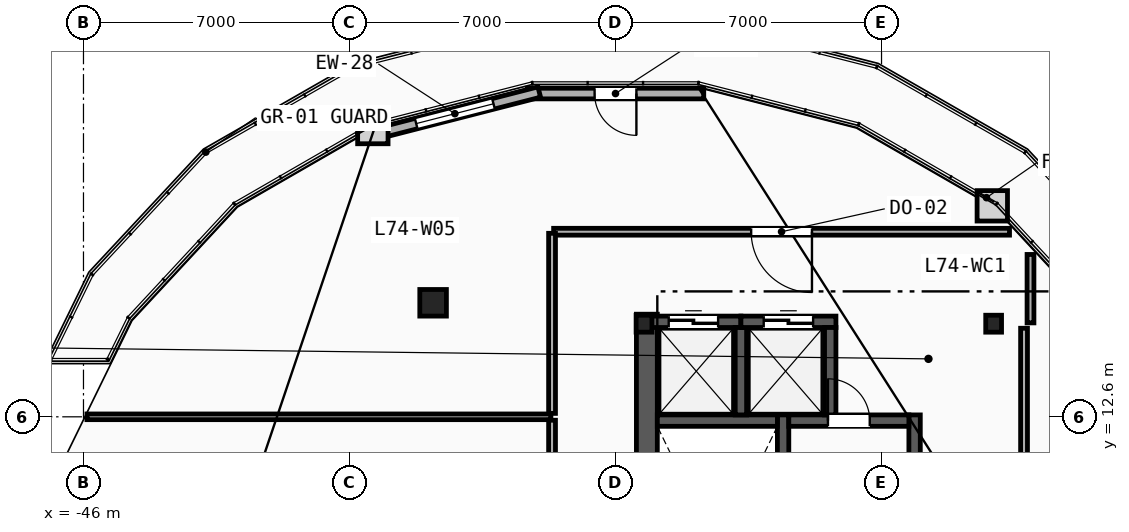
"""IFC4 building model, lengths in metres.
Left out: names, types, materials, properties, quantities, classifications, styles, units other than length and angle.
Written with IfcOpenShell. Run it as: python <this file> out.ifc"""

import sys

from ifc_helpers import new_model, si_unit, direction, frame, frame_2d, origin, origin_2d, place, context, subcontext, project, spatial, rectangle, i_section, extrude, element, fill, save


model = new_model("IFC4")
c1 = context("Model", 3, precision=1e-05, world=origin(), true_north=direction((0.0, 1.0)))
c2 = subcontext(c1, "Body", "Model", "MODEL_VIEW")
j1 = project(units=[si_unit("LENGTHUNIT", "METRE"), si_unit("PLANEANGLEUNIT", "RADIAN")], contexts=[c1])
p1 = place(None, origin())
s1 = spatial("IfcSite", under=j1, at=p1, CompositionType="ELEMENT")
p2 = place(p1, origin())
s2 = spatial("IfcBuilding", under=s1, at=p2, CompositionType="ELEMENT")
p3 = place(p2, frame((0.0, 0.0, 279.2)))
s3 = spatial("IfcBuildingStorey", under=s2, at=p3, CompositionType="ELEMENT", Elevation=279.2)
for number, where, z_axis, x_axis in (
    (1, (-22.05, 15.05, 0.0), (0.0, 0.0, 1.0), (1.0, 0.0, 0.0)),
    (2, (-31.25, 15.05, 0.0), (0.0, 0.0, 1.0), (1.0, 0.0, 0.0)),
):
    element("IfcColumn", number, at=place(p3, frame(where, z_axis=z_axis, x_axis=x_axis)), inside=s3, PredefinedType="COLUMN", context=c2, shape_type="SweptSolid", body=[
        extrude(i_section(OverallWidth=0.416, OverallDepth=0.446, WebThickness=0.039, FlangeThickness=0.063, FilletRadius=0.018, at=origin_2d()), origin(), (0.0, 0.0, 1.0), 3.6),
    ])
p4 = place(p3, frame((-36.8, 15.6, 0.0), z_axis=(0.0, 0.0, 1.0), x_axis=(1.0, 0.0, 0.0)))
e3 = element("IfcColumn", 3, at=p4, inside=s3, PredefinedType="COLUMN", context=c2, shape_type="SweptSolid", body=[
    extrude(rectangle(XDim=0.7, YDim=0.7, at=origin_2d()), origin(), (0.0, 0.0, 1.0), 3.6),
])
p5 = place(p3, frame((-29.678, 21.106, 0.0), z_axis=(0.0, 0.0, 1.0), x_axis=(-1.0, 0.0, 0.0)))
e4 = element("IfcWall", 4, at=p5, inside=s3, PredefinedType="SOLIDWALL", context=c2, shape_type="SweptSolid", body=[
    extrude(rectangle(XDim=4.644, YDim=0.28, at=frame_2d((2.322, 0.0))), origin(), (0.0, 0.0, 1.0), 3.34),
])
p6 = place(p5, frame((1.772, 0.0, 0.0)))
e5 = element("IfcOpeningElement", 5, at=p6, cuts=e4, PredefinedType="OPENING", context=c2, shape_type="SweptSolid", body=[
    extrude(rectangle(XDim=1.1, YDim=2.2, at=frame_2d((0.55, 1.1))), frame((0.0, 0.15, 0.0), z_axis=(0.0, -1.0, 0.0), x_axis=(1.0, 0.0, 0.0)), (0.0, 0.0, 1.0), 0.3),
])
p7 = place(p3, frame((-34.007, 21.146, 0.0), z_axis=(0.0, 0.0, 1.0), x_axis=(-0.968658938671, -0.248394566232, 0.0)))
e6 = element("IfcWall", 6, at=p7, inside=s3, PredefinedType="SOLIDWALL", context=c2, shape_type="SweptSolid", body=[
    extrude(rectangle(XDim=4.585, YDim=0.28, at=frame_2d((2.292, 0.0))), origin(), (0.0, 0.0, 1.0), 3.34),
])
p8 = place(p7, frame((1.243, 0.0, 0.3)))
e7 = element("IfcOpeningElement", 7, at=p8, cuts=e6, PredefinedType="OPENING", context=c2, shape_type="SweptSolid", body=[
    extrude(rectangle(XDim=2.1, YDim=2.6, at=frame_2d((1.05, 1.3))), frame((0.0, 0.15, 0.0), z_axis=(0.0, -1.0, 0.0), x_axis=(1.0, 0.0, 0.0)), (0.0, 0.0, 1.0), 0.3),
])
p9 = place(p3, frame((-31.175, 1.97, 0.0), z_axis=(0.0, 0.0, 1.0), x_axis=(0.0, 1.0, 0.0)))
e8 = element("IfcWall", 8, at=p9, inside=s3, PredefinedType="SHEAR", context=c2, shape_type="SweptSolid", body=[
    extrude(rectangle(XDim=13.33, YDim=0.55, at=frame_2d((6.665, 0.0))), origin(), (0.0, 0.0, 1.0), 3.34),
])
for number, where, z_axis, x_axis in (
    (9, (-27.59, 1.97, 0.0), (0.0, 0.0, 1.0), (0.0, 1.0, 0.0)),
    (10, (-24.13, 1.97, 0.0), (0.0, 0.0, 1.0), (0.0, 1.0, 0.0)),
):
    element("IfcWall", number, at=place(p3, frame(where, z_axis=z_axis, x_axis=x_axis)), inside=s3, PredefinedType="SHEAR", context=c2, shape_type="SweptSolid", body=[
        extrude(rectangle(XDim=10.68, YDim=0.3, at=frame_2d((5.34, 0.0))), origin(), (0.0, 0.0, 1.0), 3.34),
    ])
p10 = place(p3, frame((-30.9, 12.5, 0.0), z_axis=(0.0, 0.0, 1.0), x_axis=(1.0, 0.0, 0.0)))
e11 = element("IfcWall", 11, at=p10, inside=s3, PredefinedType="SHEAR", context=c2, shape_type="SweptSolid", body=[
    extrude(rectangle(XDim=3.16, YDim=0.3, at=frame_2d((1.58, 0.0))), origin(), (0.0, 0.0, 1.0), 3.34),
])
p11 = place(p3, frame((-27.44, 12.5, 0.0), z_axis=(0.0, 0.0, 1.0), x_axis=(1.0, 0.0, 0.0)))
e12 = element("IfcWall", 12, at=p11, inside=s3, PredefinedType="SHEAR", context=c2, shape_type="SweptSolid", body=[
    extrude(rectangle(XDim=3.16, YDim=0.3, at=frame_2d((1.58, 0.0))), origin(), (0.0, 0.0, 1.0), 3.34),
])
p12 = place(p11, frame((1.03, 0.0, 0.0)))
e13 = element("IfcOpeningElement", 13, at=p12, cuts=e12, PredefinedType="OPENING", context=c2, shape_type="SweptSolid", body=[
    extrude(rectangle(XDim=1.1, YDim=2.15, at=frame_2d((0.55, 1.075))), frame((0.0, 0.16, 0.0), z_axis=(0.0, -1.0, 0.0), x_axis=(1.0, 0.0, 0.0)), (0.0, 0.0, 1.0), 0.32),
])
p13 = place(p3, frame((-31.2, 15.1, 0.0), z_axis=(0.0, 0.0, 1.0), x_axis=(1.0, 0.0, 0.0)))
e14 = element("IfcWall", 14, at=p13, inside=s3, PredefinedType="SHEAR", context=c2, shape_type="SweptSolid", body=[
    extrude(rectangle(XDim=2.5, YDim=0.3, at=frame_2d((1.25, 0.0))), origin(), (0.0, 0.0, 1.0), 3.34),
])
p14 = place(p13, frame((0.6, 0.0, 0.0)))
e15 = element("IfcOpeningElement", 15, at=p14, cuts=e14, PredefinedType="OPENING", context=c2, shape_type="SweptSolid", body=[
    extrude(rectangle(XDim=1.3, YDim=2.2, at=frame_2d((0.65, 1.1))), frame((0.0, 0.16, 0.0), z_axis=(0.0, -1.0, 0.0), x_axis=(1.0, 0.0, 0.0)), (0.0, 0.0, 1.0), 0.32),
])
p15 = place(p3, frame((-28.7, 12.65, 0.0), z_axis=(0.0, 0.0, 1.0), x_axis=(0.0, 1.0, 0.0)))
e16 = element("IfcWall", 16, at=p15, inside=s3, PredefinedType="SHEAR", context=c2, shape_type="SweptSolid", body=[
    extrude(rectangle(XDim=2.3, YDim=0.3, at=frame_2d((1.15, 0.0))), origin(), (0.0, 0.0, 1.0), 3.34),
])
p16 = place(p3, frame((-28.7, 15.1, 0.0), z_axis=(0.0, 0.0, 1.0), x_axis=(1.0, 0.0, 0.0)))
e17 = element("IfcWall", 17, at=p16, inside=s3, PredefinedType="SHEAR", context=c2, shape_type="SweptSolid", body=[
    extrude(rectangle(XDim=2.5, YDim=0.3, at=frame_2d((1.25, 0.0))), origin(), (0.0, 0.0, 1.0), 3.34),
])
p17 = place(p16, frame((0.6, 0.0, 0.0)))
e18 = element("IfcOpeningElement", 18, at=p17, cuts=e17, PredefinedType="OPENING", context=c2, shape_type="SweptSolid", body=[
    extrude(rectangle(XDim=1.3, YDim=2.2, at=frame_2d((0.65, 1.1))), frame((0.0, 0.16, 0.0), z_axis=(0.0, -1.0, 0.0), x_axis=(1.0, 0.0, 0.0)), (0.0, 0.0, 1.0), 0.32),
])
p18 = place(p3, frame((-26.35, 12.65, 0.0), z_axis=(0.0, 0.0, 1.0), x_axis=(0.0, 1.0, 0.0)))
e19 = element("IfcWall", 19, at=p18, inside=s3, PredefinedType="SHEAR", context=c2, shape_type="SweptSolid", body=[
    extrude(rectangle(XDim=2.3, YDim=0.3, at=frame_2d((1.15, 0.0))), origin(), (0.0, 0.0, 1.0), 3.34),
])
p19 = place(p3, frame((-21.25, 10.57, 0.0), z_axis=(0.0, 0.0, 1.0), x_axis=(0.0, 1.0, 0.0)))
e20 = element("IfcWall", 20, at=p19, inside=s3, PredefinedType="PARTITIONING", context=c2, shape_type="SweptSolid", body=[
    extrude(rectangle(XDim=4.36, YDim=0.18, at=frame_2d((2.18, 0.0))), origin(), (0.0, 0.0, 1.0), 3.34),
])
p20 = place(p3, frame((-45.909, 12.6, 0.0), z_axis=(0.0, 0.0, 1.0), x_axis=(1.0, 0.0, 0.0)))
e21 = element("IfcWall", 21, at=p20, inside=s3, PredefinedType="PARTITIONING", context=c2, shape_type="SweptSolid", body=[
    extrude(rectangle(XDim=12.209, YDim=0.15, at=frame_2d((6.104, 0.0))), origin(), (0.0, 0.0, 1.0), 3.34),
])
p21 = place(p3, frame((-21.08, 15.072, 0.0), z_axis=(0.0, 0.0, 1.0), x_axis=(0.0, 1.0, 0.0)))
e22 = element("IfcWall", 22, at=p21, inside=s3, PredefinedType="PARTITIONING", context=c2, shape_type="SweptSolid", body=[
    extrude(rectangle(XDim=1.801, YDim=0.18, at=frame_2d((0.9, 0.0))), origin(), (0.0, 0.0, 1.0), 3.34),
])
p22 = place(p3, frame((-33.67, 12.51, 0.0), z_axis=(0.0, 0.0, 1.0), x_axis=(0.0, -1.0, 0.0)))
e23 = element("IfcWall", 23, at=p22, inside=s3, PredefinedType="PARTITIONING", context=c2, shape_type="SweptSolid", body=[
    extrude(rectangle(XDim=3.159, YDim=0.18, at=frame_2d((1.579, 0.0))), origin(), (0.0, 0.0, 1.0), 3.34),
])
p23 = place(p22, frame((1.079, 0.0, 0.0)))
e24 = element("IfcOpeningElement", 24, at=p23, cuts=e23, PredefinedType="OPENING", context=c2, shape_type="SweptSolid", body=[
    extrude(rectangle(XDim=1.0, YDim=2.15, at=frame_2d((0.5, 1.075))), frame((0.0, 0.1, 0.0), z_axis=(0.0, -1.0, 0.0), x_axis=(1.0, 0.0, 0.0)), (0.0, 0.0, 1.0), 0.2),
])
p24 = place(p3, frame((-21.632, 17.47, 0.0), z_axis=(0.0, 0.0, 1.0), x_axis=(-1.0, 0.0, 0.0)))
e25 = element("IfcWall", 25, at=p24, inside=s3, PredefinedType="PARTITIONING", context=c2, shape_type="SweptSolid", body=[
    extrude(rectangle(XDim=11.996, YDim=0.18, at=frame_2d((5.998, 0.0))), origin(), (0.0, 0.0, 1.0), 3.34),
])
p25 = place(p24, frame((5.198, 0.0, 0.0)))
e26 = element("IfcOpeningElement", 26, at=p25, cuts=e25, PredefinedType="OPENING", context=c2, shape_type="SweptSolid", body=[
    extrude(rectangle(XDim=1.6, YDim=2.2, at=frame_2d((0.8, 1.1))), frame((0.0, 0.1, 0.0), z_axis=(0.0, -1.0, 0.0), x_axis=(1.0, 0.0, 0.0)), (0.0, 0.0, 1.0), 0.2),
])
p26 = place(p3, frame((-33.67, 17.428, 0.0), z_axis=(0.0, 0.0, 1.0), x_axis=(0.0, -1.0, 0.0)))
e27 = element("IfcWall", 27, at=p26, inside=s3, PredefinedType="PARTITIONING", context=c2, shape_type="SweptSolid", body=[
    extrude(rectangle(XDim=4.739, YDim=0.18, at=frame_2d((2.369, 0.0))), origin(), (0.0, 0.0, 1.0), 3.34),
])
p27 = place(p6, origin())
e28 = element("IfcDoor", 28, at=p27, inside=s3, OperationType="SINGLE_SWING_LEFT", PredefinedType="DOOR", context=c2, shape_type="SweptSolid", body=[
    extrude(rectangle(XDim=1.1, YDim=2.2, at=frame_2d((0.55, 1.1))), frame((0.0, 0.025, 0.0), z_axis=(0.0, -1.0, 0.0), x_axis=(1.0, 0.0, 0.0)), (0.0, 0.0, 1.0), 0.05),
])
fill(e5, e28)
p28 = place(p8, origin())
e29 = element("IfcWindow", 29, at=p28, inside=s3, PartitioningType="SINGLE_PANEL", PredefinedType="WINDOW", context=c2, shape_type="SweptSolid", body=[
    extrude(rectangle(XDim=2.1, YDim=2.6, at=frame_2d((1.05, 1.3))), frame((0.0, 0.03, 0.0), z_axis=(0.0, -1.0, 0.0), x_axis=(1.0, 0.0, 0.0)), (0.0, 0.0, 1.0), 0.06),
])
fill(e7, e29)
p29 = place(p12, origin())
e30 = element("IfcDoor", 30, at=p29, inside=s3, OperationType="SINGLE_SWING_LEFT", PredefinedType="DOOR", context=c2, shape_type="SweptSolid", body=[
    extrude(rectangle(XDim=1.1, YDim=2.15, at=frame_2d((0.55, 1.075))), frame((0.0, 0.025, 0.0), z_axis=(0.0, -1.0, 0.0), x_axis=(1.0, 0.0, 0.0)), (0.0, 0.0, 1.0), 0.05),
])
fill(e13, e30)
p30 = place(p14, origin())
e31 = element("IfcDoor", 31, at=p30, inside=s3, OperationType="SLIDING_TO_LEFT", PredefinedType="TRAPDOOR", context=c2, shape_type="SweptSolid", body=[
    extrude(rectangle(XDim=1.3, YDim=2.2, at=frame_2d((0.65, 1.1))), frame((0.0, 0.025, 0.0), z_axis=(0.0, -1.0, 0.0), x_axis=(1.0, 0.0, 0.0)), (0.0, 0.0, 1.0), 0.05),
])
fill(e15, e31)
p31 = place(p17, origin())
e32 = element("IfcDoor", 32, at=p31, inside=s3, OperationType="SLIDING_TO_LEFT", PredefinedType="TRAPDOOR", context=c2, shape_type="SweptSolid", body=[
    extrude(rectangle(XDim=1.3, YDim=2.2, at=frame_2d((0.65, 1.1))), frame((0.0, 0.025, 0.0), z_axis=(0.0, -1.0, 0.0), x_axis=(1.0, 0.0, 0.0)), (0.0, 0.0, 1.0), 0.05),
])
fill(e18, e32)
p32 = place(p25, origin())
e33 = element("IfcDoor", 33, at=p32, inside=s3, OperationType="SINGLE_SWING_LEFT", PredefinedType="DOOR", context=c2, shape_type="SweptSolid", body=[
    extrude(rectangle(XDim=1.6, YDim=2.2, at=frame_2d((0.8, 1.1))), frame((0.0, 0.025, 0.0), z_axis=(0.0, -1.0, 0.0), x_axis=(1.0, 0.0, 0.0)), (0.0, 0.0, 1.0), 0.05),
])
fill(e26, e33)
save(model, sys.argv[1])
